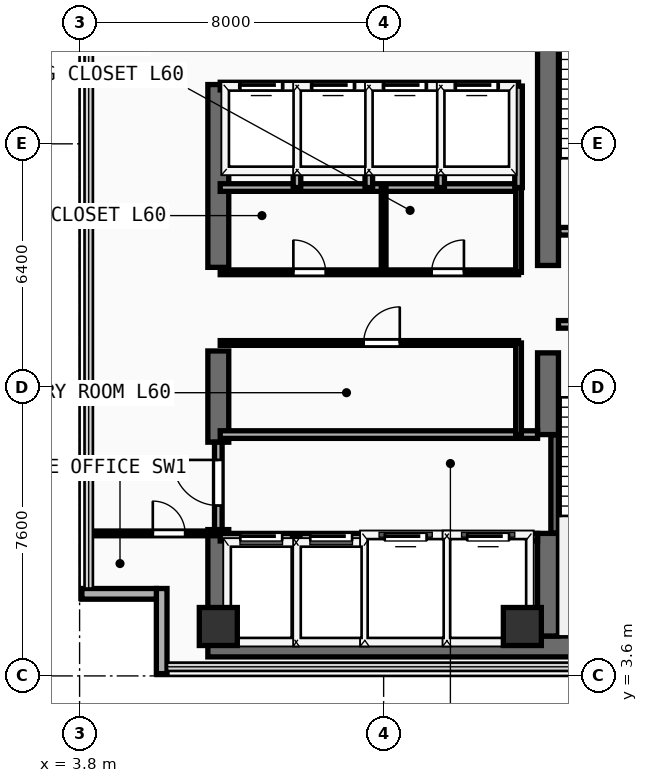
"""IFC4 building model, lengths in metres.
Left out: names, types, materials, properties, quantities, classifications, styles, units other than length and angle.
Written with IfcOpenShell. Run it as: python <this file> out.ifc"""

import sys

from ifc_helpers import new_model, si_unit, direction, frame, frame_2d, origin, origin_2d, place, context, subcontext, project, spatial, rectangle, extrude, element, fill, save


model = new_model("IFC4")
c1 = context("Model", 3, precision=1e-05, world=origin(), true_north=direction((0.0, 1.0)))
c2 = subcontext(c1, "Body", "Model", "MODEL_VIEW")
j1 = project(units=[si_unit("LENGTHUNIT", "METRE"), si_unit("PLANEANGLEUNIT", "RADIAN")], contexts=[c1])
p1 = place(None, origin())
s1 = spatial("IfcSite", under=j1, at=p1, CompositionType="ELEMENT")
p2 = place(p1, origin())
s2 = spatial("IfcBuilding", under=s1, at=p2, CompositionType="ELEMENT")
p3 = place(p2, frame((0.0, 0.0, 234.9)))
s3 = spatial("IfcBuildingStorey", under=s2, at=p3, CompositionType="ELEMENT", Elevation=234.9)
p4 = place(p3, frame((7.175, 4.375, 0.0), z_axis=(0.0, 0.0, 1.0), x_axis=(1.0, 0.0, 0.0)))
e1 = element("IfcWall", 1, at=p4, inside=s3, PredefinedType="SHEAR", context=c2, shape_type="SweptSolid", body=[
    extrude(rectangle(XDim=13.9, YDim=0.55, at=frame_2d((6.95, 0.0))), origin(), (0.0, 0.0, 1.0), 3.56),
])
p5 = place(p3, frame((7.45, 4.65, 0.0), z_axis=(0.0, 0.0, 1.0), x_axis=(0.0, 1.0, 0.0)))
e2 = element("IfcWall", 2, at=p5, inside=s3, PredefinedType="SHEAR", context=c2, shape_type="SweptSolid", body=[
    extrude(rectangle(XDim=2.8, YDim=0.55, at=frame_2d((1.4, 0.0))), origin(), (0.0, 0.0, 1.0), 3.56),
])
p6 = place(p3, frame((7.45, 9.75, 0.0), z_axis=(0.0, 0.0, 1.0), x_axis=(0.0, 1.0, 0.0)))
e3 = element("IfcWall", 3, at=p6, inside=s3, PredefinedType="SHEAR", context=c2, shape_type="SweptSolid", body=[
    extrude(rectangle(XDim=2.4, YDim=0.55, at=frame_2d((1.2, 0.0))), origin(), (0.0, 0.0, 1.0), 3.56),
])
p7 = place(p3, frame((7.45, 14.35, 0.0), z_axis=(0.0, 0.0, 1.0), x_axis=(0.0, 1.0, 0.0)))
e4 = element("IfcWall", 4, at=p7, inside=s3, PredefinedType="SHEAR", context=c2, shape_type="SweptSolid", body=[
    extrude(rectangle(XDim=4.81, YDim=0.55, at=frame_2d((2.405, 0.0))), origin(), (0.0, 0.0, 1.0), 3.56),
])
p8 = place(p3, frame((16.125, 4.65, 0.0), z_axis=(0.0, 0.0, 1.0), x_axis=(0.0, 1.0, 0.0)))
e5 = element("IfcWall", 5, at=p8, inside=s3, PredefinedType="SHEAR", context=c2, shape_type="SweptSolid", body=[
    extrude(rectangle(XDim=2.7, YDim=0.55, at=frame_2d((1.35, 0.0))), origin(), (0.0, 0.0, 1.0), 3.56),
])
p9 = place(p3, frame((16.125, 9.95, 0.0), z_axis=(0.0, 0.0, 1.0), x_axis=(0.0, 1.0, 0.0)))
e6 = element("IfcWall", 6, at=p9, inside=s3, PredefinedType="SHEAR", context=c2, shape_type="SweptSolid", body=[
    extrude(rectangle(XDim=2.15, YDim=0.55, at=frame_2d((1.075, 0.0))), origin(), (0.0, 0.0, 1.0), 3.56),
])
p10 = place(p3, frame((16.125, 14.4, 0.0), z_axis=(0.0, 0.0, 1.0), x_axis=(0.0, 1.0, 0.0)))
e7 = element("IfcWall", 7, at=p10, inside=s3, PredefinedType="SHEAR", context=c2, shape_type="SweptSolid", body=[
    extrude(rectangle(XDim=9.1, YDim=0.55, at=frame_2d((4.55, 0.0))), origin(), (0.0, 0.0, 1.0), 3.56),
])
for number, where, z_axis, x_axis in (
    (8, (7.45, 4.9, 0.0), (0.0, 0.0, 1.0), (1.0, 0.0, 0.0)),
    (9, (15.45, 4.9, 0.0), (0.0, 0.0, 1.0), (1.0, 0.0, 0.0)),
):
    element("IfcColumn", number, at=place(p3, frame(where, z_axis=z_axis, x_axis=x_axis)), inside=s3, PredefinedType="COLUMN", context=c2, shape_type="SweptSolid", body=[
        extrude(rectangle(XDim=1.0, YDim=1.0, at=origin_2d()), origin(), (0.0, 0.0, 1.0), 3.56),
    ])
p11 = place(p3, frame((5.96, 3.66, 0.0), z_axis=(0.0, 0.0, 1.0), x_axis=(0.0, 1.0, 0.0)))
e10 = element("IfcWall", 10, at=p11, inside=s3, PredefinedType="SOLIDWALL", context=c2, shape_type="SweptSolid", body=[
    extrude(rectangle(XDim=2.24, YDim=0.28, at=frame_2d((1.12, 0.0))), origin(), (0.0, 0.0, 1.0), 3.56),
])
p12 = place(p3, frame((3.86, 5.76, 0.0), z_axis=(0.0, 0.0, 1.0), x_axis=(1.0, 0.0, 0.0)))
e11 = element("IfcWall", 11, at=p12, inside=s3, PredefinedType="SOLIDWALL", context=c2, shape_type="SweptSolid", body=[
    extrude(rectangle(XDim=1.96, YDim=0.28, at=frame_2d((0.98, 0.0))), origin(), (0.0, 0.0, 1.0), 3.56),
])
p13 = place(p3, frame((16.3, 7.36, 0.0), z_axis=(0.0, 0.0, 1.0), x_axis=(0.0, 1.0, 0.0)))
e12 = element("IfcWall", 12, at=p13, inside=s3, PredefinedType="SHEAR", context=c2, shape_type="SweptSolid", body=[
    extrude(rectangle(XDim=2.58, YDim=0.2, at=frame_2d((1.29, 0.0))), origin(), (0.0, 0.0, 1.0), 3.56),
])
p14 = place(p3, frame((16.4, 12.85, 0.0), z_axis=(0.0, 0.0, 1.0), x_axis=(1.0, 0.0, 0.0)))
e13 = element("IfcWall", 13, at=p14, inside=s3, PredefinedType="PARTITIONING", context=c2, shape_type="SweptSolid", body=[
    extrude(rectangle(XDim=3.96, YDim=0.2, at=frame_2d((1.98, 0.0))), origin(), (0.0, 0.0, 1.0), 3.56),
])
p15 = place(p14, frame((1.304, 0.0, 0.0)))
e14 = element("IfcOpeningElement", 14, at=p15, cuts=e13, PredefinedType="OPENING", context=c2, shape_type="SweptSolid", body=[
    extrude(rectangle(XDim=1.1, YDim=2.2, at=frame_2d((0.55, 1.1))), frame((0.0, 0.11, 0.0), z_axis=(0.0, -1.0, 0.0), x_axis=(1.0, 0.0, 0.0)), (0.0, 0.0, 1.0), 0.22),
])
p16 = place(p3, frame((16.41, 15.3, 0.0), z_axis=(0.0, 0.0, 1.0), x_axis=(1.0, 0.0, 0.0)))
e15 = element("IfcWall", 15, at=p16, inside=s3, PredefinedType="PARTITIONING", context=c2, shape_type="SweptSolid", body=[
    extrude(rectangle(XDim=3.95, YDim=0.2, at=frame_2d((1.975, 0.0))), origin(), (0.0, 0.0, 1.0), 3.56),
])
p17 = place(p16, frame((1.294, 0.0, 0.0)))
e16 = element("IfcOpeningElement", 16, at=p17, cuts=e15, PredefinedType="OPENING", context=c2, shape_type="SweptSolid", body=[
    extrude(rectangle(XDim=1.1, YDim=2.2, at=frame_2d((0.55, 1.1))), frame((0.0, 0.11, 0.0), z_axis=(0.0, -1.0, 0.0), x_axis=(1.0, 0.0, 0.0)), (0.0, 0.0, 1.0), 0.22),
])
p18 = place(p3, frame((7.5, 7.25, 0.0), z_axis=(0.0, 0.0, 1.0), x_axis=(1.0, 0.0, 0.0)))
e17 = element("IfcWall", 17, at=p18, inside=s3, PredefinedType="PARTITIONING", context=c2, shape_type="SweptSolid", body=[
    extrude(rectangle(XDim=8.35, YDim=0.2, at=frame_2d((4.175, 0.0))), origin(), (0.0, 0.0, 1.0), 3.56),
])
p19 = place(p18, frame((0.53, 0.0, 0.0)))
e18 = element("IfcOpeningElement", 18, at=p19, cuts=e17, PredefinedType="OPENING", context=c2, shape_type="SweptSolid", body=[
    extrude(rectangle(XDim=1.1, YDim=2.2, at=frame_2d((0.55, 1.1))), frame((0.0, 0.11, 0.0), z_axis=(0.0, -1.0, 0.0), x_axis=(1.0, 0.0, 0.0)), (0.0, 0.0, 1.0), 0.22),
])
p20 = place(p18, frame((2.37, 0.0, 0.0)))
e19 = element("IfcOpeningElement", 19, at=p20, cuts=e17, PredefinedType="OPENING", context=c2, shape_type="SweptSolid", body=[
    extrude(rectangle(XDim=1.1, YDim=2.2, at=frame_2d((0.55, 1.1))), frame((0.0, 0.11, 0.0), z_axis=(0.0, -1.0, 0.0), x_axis=(1.0, 0.0, 0.0)), (0.0, 0.0, 1.0), 0.22),
])
p21 = place(p18, frame((4.33, 0.0, 0.0)))
e20 = element("IfcOpeningElement", 20, at=p21, cuts=e17, PredefinedType="OPENING", context=c2, shape_type="SweptSolid", body=[
    extrude(rectangle(XDim=1.1, YDim=2.2, at=frame_2d((0.55, 1.1))), frame((0.0, 0.11, 0.0), z_axis=(0.0, -1.0, 0.0), x_axis=(1.0, 0.0, 0.0)), (0.0, 0.0, 1.0), 0.22),
])
p22 = place(p18, frame((6.5, 0.0, 0.0)))
e21 = element("IfcOpeningElement", 21, at=p22, cuts=e17, PredefinedType="OPENING", context=c2, shape_type="SweptSolid", body=[
    extrude(rectangle(XDim=1.1, YDim=2.2, at=frame_2d((0.55, 1.1))), frame((0.0, 0.11, 0.0), z_axis=(0.0, -1.0, 0.0), x_axis=(1.0, 0.0, 0.0)), (0.0, 0.0, 1.0), 0.22),
])
p23 = place(p3, frame((7.5, 9.95, 0.0), z_axis=(0.0, 0.0, 1.0), x_axis=(1.0, 0.0, 0.0)))
e22 = element("IfcWall", 22, at=p23, inside=s3, PredefinedType="PARTITIONING", context=c2, shape_type="SweptSolid", body=[
    extrude(rectangle(XDim=8.35, YDim=0.2, at=frame_2d((4.175, 0.0))), origin(), (0.0, 0.0, 1.0), 3.56),
])
for number, where, z_axis, x_axis in (
    (23, (9.5, 4.45, 0.0), (0.0, 0.0, 1.0), (0.0, 1.0, 0.0)),
    (24, (11.36, 4.45, 0.0), (0.0, 0.0, 1.0), (0.0, 1.0, 0.0)),
    (25, (13.46, 4.45, 0.0), (0.0, 0.0, 1.0), (0.0, 1.0, 0.0)),
):
    element("IfcWall", number, at=place(p3, frame(where, z_axis=z_axis, x_axis=x_axis)), inside=s3, PredefinedType="PARTITIONING", context=c2, shape_type="SweptSolid", body=[
        extrude(rectangle(XDim=2.8, YDim=0.2, at=frame_2d((1.4, 0.0))), origin(), (0.0, 0.0, 1.0), 3.56),
    ])
p24 = place(p3, frame((7.45, 7.45, 0.0), z_axis=(0.0, 0.0, 1.0), x_axis=(0.0, 1.0, 0.0)))
e26 = element("IfcWall", 26, at=p24, inside=s3, PredefinedType="PARTITIONING", context=c2, shape_type="SweptSolid", body=[
    extrude(rectangle(XDim=2.3, YDim=0.2, at=frame_2d((1.15, 0.0))), origin(), (0.0, 0.0, 1.0), 2.54),
])
p25 = place(p24, frame((0.633, 0.0, 0.0)))
e27 = element("IfcOpeningElement", 27, at=p25, cuts=e26, PredefinedType="OPENING", context=c2, shape_type="SweptSolid", body=[
    extrude(rectangle(XDim=1.2, YDim=2.25, at=frame_2d((0.6, 1.125))), frame((0.0, 0.11, 0.0), z_axis=(0.0, -1.0, 0.0), x_axis=(1.0, 0.0, 0.0)), (0.0, 0.0, 1.0), 0.22),
])
p26 = place(p3, frame((7.5, 16.45, 0.0), z_axis=(0.0, 0.0, 1.0), x_axis=(1.0, 0.0, 0.0)))
e28 = element("IfcWall", 28, at=p26, inside=s3, PredefinedType="PARTITIONING", context=c2, shape_type="SweptSolid", body=[
    extrude(rectangle(XDim=7.85, YDim=0.2, at=frame_2d((3.925, 0.0))), origin(), (0.0, 0.0, 1.0), 3.56),
])
p27 = place(p3, frame((7.5, 12.36, 0.0), z_axis=(0.0, 0.0, 1.0), x_axis=(1.0, 0.0, 0.0)))
e29 = element("IfcWall", 29, at=p27, inside=s3, PredefinedType="PARTITIONING", context=c2, shape_type="SweptSolid", body=[
    extrude(rectangle(XDim=7.85, YDim=0.125, at=frame_2d((3.925, 0.0))), origin(), (0.0, 0.0, 1.0), 3.56),
])
p28 = place(p27, frame((3.775, 0.0, 0.0)))
e30 = element("IfcOpeningElement", 30, at=p28, cuts=e29, PredefinedType="OPENING", context=c2, shape_type="SweptSolid", body=[
    extrude(rectangle(XDim=0.95, YDim=2.15, at=frame_2d((0.475, 1.075))), frame((0.0, 0.073, 0.0), z_axis=(0.0, -1.0, 0.0), x_axis=(1.0, 0.0, 0.0)), (0.0, 0.0, 1.0), 0.145),
])
p29 = place(p3, frame((7.5, 14.22, 0.0), z_axis=(0.0, 0.0, 1.0), x_axis=(1.0, 0.0, 0.0)))
e31 = element("IfcWall", 31, at=p29, inside=s3, PredefinedType="PARTITIONING", context=c2, shape_type="SweptSolid", body=[
    extrude(rectangle(XDim=7.85, YDim=0.125, at=frame_2d((3.925, 0.0))), origin(), (0.0, 0.0, 1.0), 3.56),
])
p30 = place(p29, frame((1.925, 0.0, 0.0)))
e32 = element("IfcOpeningElement", 32, at=p30, cuts=e31, PredefinedType="OPENING", context=c2, shape_type="SweptSolid", body=[
    extrude(rectangle(XDim=0.85, YDim=2.15, at=frame_2d((0.425, 1.075))), frame((0.0, 0.073, 0.0), z_axis=(0.0, -1.0, 0.0), x_axis=(1.0, 0.0, 0.0)), (0.0, 0.0, 1.0), 0.145),
])
p31 = place(p29, frame((5.563, 0.0, 0.0)))
e33 = element("IfcOpeningElement", 33, at=p31, cuts=e31, PredefinedType="OPENING", context=c2, shape_type="SweptSolid", body=[
    extrude(rectangle(XDim=0.85, YDim=2.15, at=frame_2d((0.425, 1.075))), frame((0.0, 0.073, 0.0), z_axis=(0.0, -1.0, 0.0), x_axis=(1.0, 0.0, 0.0)), (0.0, 0.0, 1.0), 0.145),
])
p32 = place(p3, frame((15.35, 9.95, 0.0), z_axis=(0.0, 0.0, 1.0), x_axis=(0.0, 1.0, 0.0)))
e34 = element("IfcWall", 34, at=p32, inside=s3, PredefinedType="PARTITIONING", context=c2, shape_type="SweptSolid", body=[
    extrude(rectangle(XDim=2.41, YDim=0.15, at=frame_2d((1.205, 0.0))), origin(), (0.0, 0.0, 1.0), 3.56),
])
p33 = place(p3, frame((15.35, 14.22, 0.0), z_axis=(0.0, 0.0, 1.0), x_axis=(0.0, 1.0, 0.0)))
e35 = element("IfcWall", 35, at=p33, inside=s3, PredefinedType="PARTITIONING", context=c2, shape_type="SweptSolid", body=[
    extrude(rectangle(XDim=2.23, YDim=0.15, at=frame_2d((1.115, 0.0))), origin(), (0.0, 0.0, 1.0), 3.56),
])
p34 = place(p3, frame((11.8, 14.22, 0.0), z_axis=(0.0, 0.0, 1.0), x_axis=(0.0, 1.0, 0.0)))
e36 = element("IfcWall", 36, at=p34, inside=s3, PredefinedType="PARTITIONING", context=c2, shape_type="SweptSolid", body=[
    extrude(rectangle(XDim=2.23, YDim=0.125, at=frame_2d((1.115, 0.0))), origin(), (0.0, 0.0, 1.0), 3.56),
])
p35 = place(p3, frame((7.5, 19.12, 0.0), z_axis=(0.0, 0.0, 1.0), x_axis=(1.0, 0.0, 0.0)))
e37 = element("IfcWall", 37, at=p35, inside=s3, PredefinedType="PARTITIONING", context=c2, shape_type="SweptSolid", body=[
    extrude(rectangle(XDim=7.85, YDim=0.2, at=frame_2d((3.925, 0.0))), origin(), (0.0, 0.0, 1.0), 3.56),
])
p36 = place(p35, frame((0.53, 0.0, 0.0)))
e38 = element("IfcOpeningElement", 38, at=p36, cuts=e37, PredefinedType="OPENING", context=c2, shape_type="SweptSolid", body=[
    extrude(rectangle(XDim=1.1, YDim=2.2, at=frame_2d((0.55, 1.1))), frame((0.0, 0.11, 0.0), z_axis=(0.0, -1.0, 0.0), x_axis=(1.0, 0.0, 0.0)), (0.0, 0.0, 1.0), 0.22),
])
p37 = place(p35, frame((2.42, 0.0, 0.0)))
e39 = element("IfcOpeningElement", 39, at=p37, cuts=e37, PredefinedType="OPENING", context=c2, shape_type="SweptSolid", body=[
    extrude(rectangle(XDim=1.1, YDim=2.2, at=frame_2d((0.55, 1.1))), frame((0.0, 0.11, 0.0), z_axis=(0.0, -1.0, 0.0), x_axis=(1.0, 0.0, 0.0)), (0.0, 0.0, 1.0), 0.22),
])
p38 = place(p35, frame((4.31, 0.0, 0.0)))
e40 = element("IfcOpeningElement", 40, at=p38, cuts=e37, PredefinedType="OPENING", context=c2, shape_type="SweptSolid", body=[
    extrude(rectangle(XDim=1.1, YDim=2.2, at=frame_2d((0.55, 1.1))), frame((0.0, 0.11, 0.0), z_axis=(0.0, -1.0, 0.0), x_axis=(1.0, 0.0, 0.0)), (0.0, 0.0, 1.0), 0.22),
])
p39 = place(p35, frame((6.2, 0.0, 0.0)))
e41 = element("IfcOpeningElement", 41, at=p39, cuts=e37, PredefinedType="OPENING", context=c2, shape_type="SweptSolid", body=[
    extrude(rectangle(XDim=1.1, YDim=2.2, at=frame_2d((0.55, 1.1))), frame((0.0, 0.11, 0.0), z_axis=(0.0, -1.0, 0.0), x_axis=(1.0, 0.0, 0.0)), (0.0, 0.0, 1.0), 0.22),
])
for number, where, z_axis, x_axis in (
    (42, (15.35, 16.45, 0.0), (0.0, 0.0, 1.0), (0.0, 1.0, 0.0)),
    (43, (9.52, 16.45, 0.0), (0.0, 0.0, 1.0), (0.0, 1.0, 0.0)),
    (44, (11.41, 16.45, 0.0), (0.0, 0.0, 1.0), (0.0, 1.0, 0.0)),
    (45, (13.3, 16.45, 0.0), (0.0, 0.0, 1.0), (0.0, 1.0, 0.0)),
):
    element("IfcWall", number, at=place(p3, frame(where, z_axis=z_axis, x_axis=x_axis)), inside=s3, PredefinedType="PARTITIONING", context=c2, shape_type="SweptSolid", body=[
        extrude(rectangle(XDim=2.67, YDim=0.2, at=frame_2d((1.335, 0.0))), origin(), (0.0, 0.0, 1.0), 3.56),
    ])
p40 = place(p3, frame((4.04, 7.35, 0.0), z_axis=(0.0, 0.0, 1.0), x_axis=(1.0, 0.0, 0.0)))
e46 = element("IfcWall", 46, at=p40, inside=s3, PredefinedType="PARTITIONING", context=c2, shape_type="SweptSolid", body=[
    extrude(rectangle(XDim=3.36, YDim=0.125, at=frame_2d((1.68, 0.0))), origin(), (0.0, 0.0, 1.0), 3.56),
])
p41 = place(p40, frame((1.687, 0.0, 0.0)))
e47 = element("IfcOpeningElement", 47, at=p41, cuts=e46, PredefinedType="OPENING", context=c2, shape_type="SweptSolid", body=[
    extrude(rectangle(XDim=0.85, YDim=2.15, at=frame_2d((0.425, 1.075))), frame((0.0, 0.073, 0.0), z_axis=(0.0, -1.0, 0.0), x_axis=(1.0, 0.0, 0.0)), (0.0, 0.0, 1.0), 0.145),
])
p42 = place(p19, origin())
e48 = element("IfcDoor", 48, at=p42, inside=s3, OperationType="SLIDING_TO_LEFT", PredefinedType="DOOR", context=c2, shape_type="SweptSolid", body=[
    extrude(rectangle(XDim=1.1, YDim=2.2, at=frame_2d((0.55, 1.1))), frame((0.0, 0.025, 0.0), z_axis=(0.0, -1.0, 0.0), x_axis=(1.0, 0.0, 0.0)), (0.0, 0.0, 1.0), 0.05),
])
fill(e18, e48)
p43 = place(p20, origin())
e49 = element("IfcDoor", 49, at=p43, inside=s3, OperationType="SLIDING_TO_LEFT", PredefinedType="DOOR", context=c2, shape_type="SweptSolid", body=[
    extrude(rectangle(XDim=1.1, YDim=2.2, at=frame_2d((0.55, 1.1))), frame((0.0, 0.025, 0.0), z_axis=(0.0, -1.0, 0.0), x_axis=(1.0, 0.0, 0.0)), (0.0, 0.0, 1.0), 0.05),
])
fill(e19, e49)
p44 = place(p21, origin())
e50 = element("IfcDoor", 50, at=p44, inside=s3, OperationType="SLIDING_TO_LEFT", PredefinedType="DOOR", context=c2, shape_type="SweptSolid", body=[
    extrude(rectangle(XDim=1.1, YDim=2.2, at=frame_2d((0.55, 1.1))), frame((0.0, 0.025, 0.0), z_axis=(0.0, -1.0, 0.0), x_axis=(1.0, 0.0, 0.0)), (0.0, 0.0, 1.0), 0.05),
])
fill(e20, e50)
p45 = place(p22, origin())
e51 = element("IfcDoor", 51, at=p45, inside=s3, OperationType="SLIDING_TO_LEFT", PredefinedType="DOOR", context=c2, shape_type="SweptSolid", body=[
    extrude(rectangle(XDim=1.1, YDim=2.2, at=frame_2d((0.55, 1.1))), frame((0.0, 0.025, 0.0), z_axis=(0.0, -1.0, 0.0), x_axis=(1.0, 0.0, 0.0)), (0.0, 0.0, 1.0), 0.05),
])
fill(e21, e51)
p46 = place(p25, frame((1.2, 0.0, 0.0), z_axis=(0.0, 0.0, 1.0), x_axis=(-1.0, 0.0, 0.0)))
e52 = element("IfcDoor", 52, at=p46, inside=s3, OperationType="SINGLE_SWING_LEFT", PredefinedType="DOOR", context=c2, shape_type="SweptSolid", body=[
    extrude(rectangle(XDim=1.2, YDim=2.25, at=frame_2d((0.6, 1.125))), frame((0.0, 0.025, 0.0), z_axis=(0.0, -1.0, 0.0), x_axis=(1.0, 0.0, 0.0)), (0.0, 0.0, 1.0), 0.05),
])
fill(e27, e52)
p47 = place(p28, origin())
e53 = element("IfcDoor", 53, at=p47, inside=s3, OperationType="SINGLE_SWING_RIGHT", PredefinedType="DOOR", context=c2, shape_type="SweptSolid", body=[
    extrude(rectangle(XDim=0.95, YDim=2.15, at=frame_2d((0.475, 1.075))), frame((0.0, 0.025, 0.0), z_axis=(0.0, -1.0, 0.0), x_axis=(1.0, 0.0, 0.0)), (0.0, 0.0, 1.0), 0.05),
])
fill(e30, e53)
p48 = place(p30, origin())
e54 = element("IfcDoor", 54, at=p48, inside=s3, OperationType="SINGLE_SWING_LEFT", PredefinedType="DOOR", context=c2, shape_type="SweptSolid", body=[
    extrude(rectangle(XDim=0.85, YDim=2.15, at=frame_2d((0.425, 1.075))), frame((0.0, 0.025, 0.0), z_axis=(0.0, -1.0, 0.0), x_axis=(1.0, 0.0, 0.0)), (0.0, 0.0, 1.0), 0.05),
])
fill(e32, e54)
p49 = place(p31, origin())
e55 = element("IfcDoor", 55, at=p49, inside=s3, OperationType="SINGLE_SWING_RIGHT", PredefinedType="DOOR", context=c2, shape_type="SweptSolid", body=[
    extrude(rectangle(XDim=0.85, YDim=2.15, at=frame_2d((0.425, 1.075))), frame((0.0, 0.025, 0.0), z_axis=(0.0, -1.0, 0.0), x_axis=(1.0, 0.0, 0.0)), (0.0, 0.0, 1.0), 0.05),
])
fill(e33, e55)
p50 = place(p36, origin())
e56 = element("IfcDoor", 56, at=p50, inside=s3, OperationType="SLIDING_TO_LEFT", PredefinedType="DOOR", context=c2, shape_type="SweptSolid", body=[
    extrude(rectangle(XDim=1.1, YDim=2.2, at=frame_2d((0.55, 1.1))), frame((0.0, 0.025, 0.0), z_axis=(0.0, -1.0, 0.0), x_axis=(1.0, 0.0, 0.0)), (0.0, 0.0, 1.0), 0.05),
])
fill(e38, e56)
p51 = place(p37, origin())
e57 = element("IfcDoor", 57, at=p51, inside=s3, OperationType="SLIDING_TO_LEFT", PredefinedType="DOOR", context=c2, shape_type="SweptSolid", body=[
    extrude(rectangle(XDim=1.1, YDim=2.2, at=frame_2d((0.55, 1.1))), frame((0.0, 0.025, 0.0), z_axis=(0.0, -1.0, 0.0), x_axis=(1.0, 0.0, 0.0)), (0.0, 0.0, 1.0), 0.05),
])
fill(e39, e57)
p52 = place(p38, origin())
e58 = element("IfcDoor", 58, at=p52, inside=s3, OperationType="SLIDING_TO_LEFT", PredefinedType="DOOR", context=c2, shape_type="SweptSolid", body=[
    extrude(rectangle(XDim=1.1, YDim=2.2, at=frame_2d((0.55, 1.1))), frame((0.0, 0.025, 0.0), z_axis=(0.0, -1.0, 0.0), x_axis=(1.0, 0.0, 0.0)), (0.0, 0.0, 1.0), 0.05),
])
fill(e40, e58)
p53 = place(p39, origin())
e59 = element("IfcDoor", 59, at=p53, inside=s3, OperationType="SLIDING_TO_LEFT", PredefinedType="DOOR", context=c2, shape_type="SweptSolid", body=[
    extrude(rectangle(XDim=1.1, YDim=2.2, at=frame_2d((0.55, 1.1))), frame((0.0, 0.025, 0.0), z_axis=(0.0, -1.0, 0.0), x_axis=(1.0, 0.0, 0.0)), (0.0, 0.0, 1.0), 0.05),
])
fill(e41, e59)
p54 = place(p41, origin())
e60 = element("IfcDoor", 60, at=p54, inside=s3, OperationType="SINGLE_SWING_LEFT", PredefinedType="DOOR", context=c2, shape_type="SweptSolid", body=[
    extrude(rectangle(XDim=0.85, YDim=2.15, at=frame_2d((0.425, 1.075))), frame((0.0, 0.025, 0.0), z_axis=(0.0, -1.0, 0.0), x_axis=(1.0, 0.0, 0.0)), (0.0, 0.0, 1.0), 0.05),
])
fill(e47, e60)
save(model, sys.argv[1])
